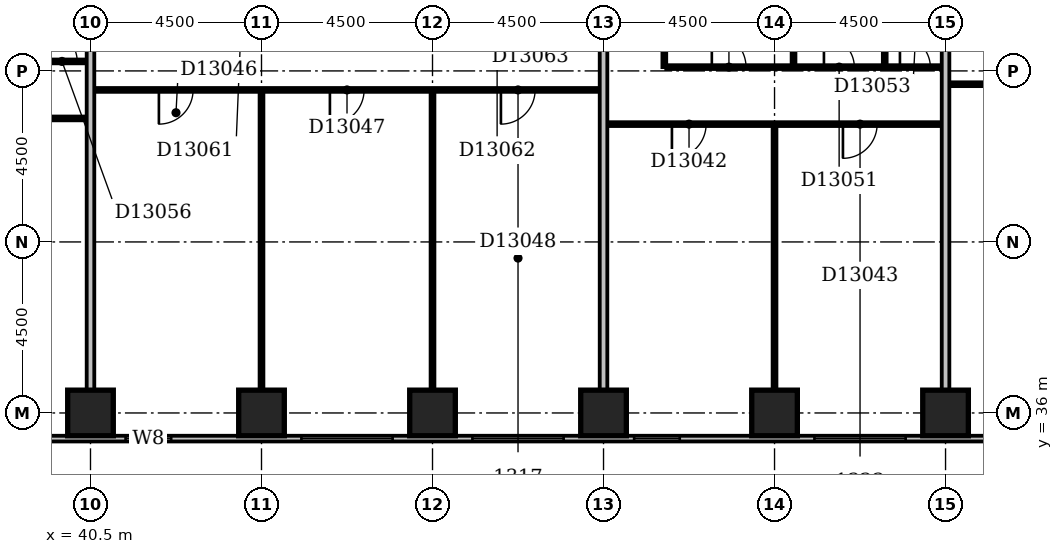
"""IFC4 building model, lengths in metres.
Left out: names, types, materials, properties, quantities, classifications, styles, units other than length and angle.
Written with IfcOpenShell. Run it as: python <this file> out.ifc"""

import sys

from ifc_helpers import new_model, si_unit, direction, frame, frame_2d, origin, origin_2d, place, context, subcontext, project, spatial, rectangle, extrude, element, fill, save


model = new_model("IFC4")
c1 = context("Model", 3, precision=1e-05, world=origin(), true_north=direction((0.0, 1.0)))
c2 = subcontext(c1, "Body", "Model", "MODEL_VIEW")
j1 = project(units=[si_unit("LENGTHUNIT", "METRE"), si_unit("PLANEANGLEUNIT", "RADIAN")], contexts=[c1])
p1 = place(None, origin())
s1 = spatial("IfcSite", under=j1, at=p1, CompositionType="ELEMENT")
p2 = place(p1, origin())
s2 = spatial("IfcBuilding", under=s1, at=p2, CompositionType="ELEMENT")
p3 = place(p2, frame((0.0, 0.0, 57.8)))
s3 = spatial("IfcBuildingStorey", under=s2, at=p3, CompositionType="ELEMENT", Elevation=57.8)
for number, where, z_axis, x_axis in (
    (1, (40.5, 36.0, -0.3), (0.0, 0.0, 1.0), (1.0, 0.0, 0.0)),
    (2, (45.0, 36.0, -0.3), (0.0, 0.0, 1.0), (1.0, 0.0, 0.0)),
    (3, (49.5, 36.0, -0.3), (0.0, 0.0, 1.0), (1.0, 0.0, 0.0)),
    (4, (54.0, 36.0, -0.3), (0.0, 0.0, 1.0), (1.0, 0.0, 0.0)),
    (5, (58.5, 36.0, -0.3), (0.0, 0.0, 1.0), (1.0, 0.0, 0.0)),
    (6, (63.0, 36.0, -0.3), (0.0, 0.0, 1.0), (1.0, 0.0, 0.0)),
):
    element("IfcColumn", number, at=place(p3, frame(where, z_axis=z_axis, x_axis=x_axis)), inside=s3, PredefinedType="COLUMN", context=c2, shape_type="SweptSolid", body=[
        extrude(rectangle(XDim=1.2, YDim=1.2, at=origin_2d()), origin(), (0.0, 0.0, 1.0), 3.6),
    ])
p4 = place(p3, frame((23.1, 35.325, 0.0), z_axis=(0.0, 0.0, 1.0), x_axis=(1.0, 0.0, 0.0)))
e7 = element("IfcWall", 7, at=p4, inside=s3, PredefinedType="STANDARD", context=c2, shape_type="SweptSolid", body=[
    extrude(rectangle(XDim=45.15, YDim=0.15, at=frame_2d((22.575, 0.0))), origin(), (0.0, 0.0, 1.0), 2.7),
])
p5 = place(p4, frame((0.45, 0.0, 0.6)))
e8 = element("IfcOpeningElement", 8, at=p5, cuts=e7, PredefinedType="OPENING", context=c2, shape_type="SweptSolid", body=[
    extrude(rectangle(XDim=2.4, YDim=1.8, at=frame_2d((1.2, 0.9))), frame((0.0, 0.087, 0.0), z_axis=(0.0, -1.0, 0.0), x_axis=(1.0, 0.0, 0.0)), (0.0, 0.0, 1.0), 0.174),
])
p6 = place(p4, frame((6.854, 0.0, 0.6)))
e9 = element("IfcOpeningElement", 9, at=p6, cuts=e7, PredefinedType="OPENING", context=c2, shape_type="SweptSolid", body=[
    extrude(rectangle(XDim=0.6, YDim=1.8, at=frame_2d((0.3, 0.9))), frame((0.0, 0.087, 0.0), z_axis=(0.0, -1.0, 0.0), x_axis=(1.0, 0.0, 0.0)), (0.0, 0.0, 1.0), 0.174),
])
p7 = place(p4, frame((9.45, 0.0, 0.6)))
e10 = element("IfcOpeningElement", 10, at=p7, cuts=e7, PredefinedType="OPENING", context=c2, shape_type="SweptSolid", body=[
    extrude(rectangle(XDim=2.4, YDim=1.8, at=frame_2d((1.2, 0.9))), frame((0.0, 0.087, 0.0), z_axis=(0.0, -1.0, 0.0), x_axis=(1.0, 0.0, 0.0)), (0.0, 0.0, 1.0), 0.174),
])
p8 = place(p4, frame((13.95, 0.0, 0.6)))
e11 = element("IfcOpeningElement", 11, at=p8, cuts=e7, PredefinedType="OPENING", context=c2, shape_type="SweptSolid", body=[
    extrude(rectangle(XDim=2.4, YDim=1.8, at=frame_2d((1.2, 0.9))), frame((0.0, 0.087, 0.0), z_axis=(0.0, -1.0, 0.0), x_axis=(1.0, 0.0, 0.0)), (0.0, 0.0, 1.0), 0.174),
])
p9 = place(p4, frame((18.323, 0.0, 0.6)))
e12 = element("IfcOpeningElement", 12, at=p9, cuts=e7, PredefinedType="OPENING", context=c2, shape_type="SweptSolid", body=[
    extrude(rectangle(XDim=1.2, YDim=1.8, at=frame_2d((0.6, 0.9))), frame((0.0, 0.087, 0.0), z_axis=(0.0, -1.0, 0.0), x_axis=(1.0, 0.0, 0.0)), (0.0, 0.0, 1.0), 0.174),
])
p10 = place(p4, frame((22.95, 0.0, 0.6)))
e13 = element("IfcOpeningElement", 13, at=p10, cuts=e7, PredefinedType="OPENING", context=c2, shape_type="SweptSolid", body=[
    extrude(rectangle(XDim=2.4, YDim=1.8, at=frame_2d((1.2, 0.9))), frame((0.0, 0.087, 0.0), z_axis=(0.0, -1.0, 0.0), x_axis=(1.0, 0.0, 0.0)), (0.0, 0.0, 1.0), 0.174),
])
p11 = place(p4, frame((27.45, 0.0, 0.6)))
e14 = element("IfcOpeningElement", 14, at=p11, cuts=e7, PredefinedType="OPENING", context=c2, shape_type="SweptSolid", body=[
    extrude(rectangle(XDim=2.4, YDim=1.8, at=frame_2d((1.2, 0.9))), frame((0.0, 0.087, 0.0), z_axis=(0.0, -1.0, 0.0), x_axis=(1.0, 0.0, 0.0)), (0.0, 0.0, 1.0), 0.174),
])
p12 = place(p4, frame((31.706, 0.0, 0.6)))
e15 = element("IfcOpeningElement", 15, at=p12, cuts=e7, PredefinedType="OPENING", context=c2, shape_type="SweptSolid", body=[
    extrude(rectangle(XDim=1.2, YDim=1.8, at=frame_2d((0.6, 0.9))), frame((0.0, 0.087, 0.0), z_axis=(0.0, -1.0, 0.0), x_axis=(1.0, 0.0, 0.0)), (0.0, 0.0, 1.0), 0.174),
])
p13 = place(p4, frame((36.45, 0.0, 0.6)))
e16 = element("IfcOpeningElement", 16, at=p13, cuts=e7, PredefinedType="OPENING", context=c2, shape_type="SweptSolid", body=[
    extrude(rectangle(XDim=2.4, YDim=1.8, at=frame_2d((1.2, 0.9))), frame((0.0, 0.087, 0.0), z_axis=(0.0, -1.0, 0.0), x_axis=(1.0, 0.0, 0.0)), (0.0, 0.0, 1.0), 0.174),
])
p14 = place(p4, frame((40.95, 0.0, 0.6)))
e17 = element("IfcOpeningElement", 17, at=p14, cuts=e7, PredefinedType="OPENING", context=c2, shape_type="SweptSolid", body=[
    extrude(rectangle(XDim=2.4, YDim=1.8, at=frame_2d((1.2, 0.9))), frame((0.0, 0.087, 0.0), z_axis=(0.0, -1.0, 0.0), x_axis=(1.0, 0.0, 0.0)), (0.0, 0.0, 1.0), 0.174),
])
p15 = place(p3, frame((40.5, 36.6, 0.0), z_axis=(0.0, 0.0, 1.0), x_axis=(0.0, 1.0, 0.0)))
e18 = element("IfcWall", 18, at=p15, inside=s3, PredefinedType="PARTITIONING", context=c2, shape_type="SweptSolid", body=[
    extrude(rectangle(XDim=12.8, YDim=0.2, at=frame_2d((6.4, 0.0))), origin(), (0.0, 0.0, 1.0), 3.3),
])
p16 = place(p3, frame((45.0, 36.6, 0.0), z_axis=(0.0, 0.0, 1.0), x_axis=(0.0, 1.0, 0.0)))
e19 = element("IfcWall", 19, at=p16, inside=s3, PredefinedType="PARTITIONING", context=c2, shape_type="SweptSolid", body=[
    extrude(rectangle(XDim=7.85, YDim=0.1, at=frame_2d((3.925, 0.0))), origin(), (0.0, 0.0, 1.0), 2.6),
])
p17 = place(p3, frame((49.5, 36.6, 0.0), z_axis=(0.0, 0.0, 1.0), x_axis=(0.0, 1.0, 0.0)))
e20 = element("IfcWall", 20, at=p17, inside=s3, PredefinedType="PARTITIONING", context=c2, shape_type="SweptSolid", body=[
    extrude(rectangle(XDim=7.85, YDim=0.1, at=frame_2d((3.925, 0.0))), origin(), (0.0, 0.0, 1.0), 3.3),
])
p18 = place(p3, frame((54.0, 36.6, 0.0), z_axis=(0.0, 0.0, 1.0), x_axis=(0.0, 1.0, 0.0)))
e21 = element("IfcWall", 21, at=p18, inside=s3, PredefinedType="PARTITIONING", context=c2, shape_type="SweptSolid", body=[
    extrude(rectangle(XDim=12.8, YDim=0.2, at=frame_2d((6.4, 0.0))), origin(), (0.0, 0.0, 1.0), 2.6),
])
p19 = place(p3, frame((58.5, 36.6, 0.0), z_axis=(0.0, 0.0, 1.0), x_axis=(0.0, 1.0, 0.0)))
e22 = element("IfcWall", 22, at=p19, inside=s3, PredefinedType="PARTITIONING", context=c2, shape_type="SweptSolid", body=[
    extrude(rectangle(XDim=6.95, YDim=0.1, at=frame_2d((3.475, 0.0))), origin(), (0.0, 0.0, 1.0), 3.3),
])
p20 = place(p3, frame((63.0, 36.6, 0.0), z_axis=(0.0, 0.0, 1.0), x_axis=(0.0, 1.0, 0.0)))
e23 = element("IfcWall", 23, at=p20, inside=s3, PredefinedType="PARTITIONING", context=c2, shape_type="SweptSolid", body=[
    extrude(rectangle(XDim=12.8, YDim=0.2, at=frame_2d((6.4, 0.0))), origin(), (0.0, 0.0, 1.0), 2.4),
])
p21 = place(p3, frame((54.1, 43.6, 0.0), z_axis=(0.0, 0.0, 1.0), x_axis=(1.0, 0.0, 0.0)))
e24 = element("IfcWall", 24, at=p21, inside=s3, PredefinedType="PARTITIONING", context=c2, shape_type="SweptSolid", body=[
    extrude(rectangle(XDim=8.8, YDim=0.1, at=frame_2d((4.4, 0.0))), origin(), (0.0, 0.0, 1.0), 3.3),
])
p22 = place(p21, frame((1.7, 0.0, 0.0)))
e25 = element("IfcOpeningElement", 25, at=p22, cuts=e24, PredefinedType="OPENING", context=c2, shape_type="SweptSolid", body=[
    extrude(rectangle(XDim=0.9, YDim=2.1, at=frame_2d((0.45, 1.05))), frame((0.0, 0.062, 0.0), z_axis=(0.0, -1.0, 0.0), x_axis=(1.0, 0.0, 0.0)), (0.0, 0.0, 1.0), 0.124),
])
p23 = place(p21, frame((6.2, 0.0, 0.0)))
e26 = element("IfcOpeningElement", 26, at=p23, cuts=e24, PredefinedType="OPENING", context=c2, shape_type="SweptSolid", body=[
    extrude(rectangle(XDim=0.9, YDim=2.1, at=frame_2d((0.45, 1.05))), frame((0.0, 0.062, 0.0), z_axis=(0.0, -1.0, 0.0), x_axis=(1.0, 0.0, 0.0)), (0.0, 0.0, 1.0), 0.124),
])
p24 = place(p3, frame((27.1, 43.75, 0.0), z_axis=(0.0, 0.0, 1.0), x_axis=(1.0, 0.0, 0.0)))
e27 = element("IfcWall", 27, at=p24, inside=s3, PredefinedType="PARTITIONING", context=c2, shape_type="SweptSolid", body=[
    extrude(rectangle(XDim=13.3, YDim=0.1, at=frame_2d((6.65, 0.0))), origin(), (0.0, 0.0, 1.0), 3.3),
])
p25 = place(p24, frame((3.9, 0.0, 0.0)))
e28 = element("IfcOpeningElement", 28, at=p25, cuts=e27, PredefinedType="OPENING", context=c2, shape_type="SweptSolid", body=[
    extrude(rectangle(XDim=0.9, YDim=2.1, at=frame_2d((0.45, 1.05))), frame((0.0, 0.062, 0.0), z_axis=(0.0, -1.0, 0.0), x_axis=(1.0, 0.0, 0.0)), (0.0, 0.0, 1.0), 0.124),
])
p26 = place(p24, frame((10.7, 0.0, 0.0)))
e29 = element("IfcOpeningElement", 29, at=p26, cuts=e27, PredefinedType="OPENING", context=c2, shape_type="SweptSolid", body=[
    extrude(rectangle(XDim=0.9, YDim=2.1, at=frame_2d((0.45, 1.05))), frame((0.0, 0.062, 0.0), z_axis=(0.0, -1.0, 0.0), x_axis=(1.0, 0.0, 0.0)), (0.0, 0.0, 1.0), 0.124),
])
p27 = place(p3, frame((40.6, 44.5, 0.0), z_axis=(0.0, 0.0, 1.0), x_axis=(1.0, 0.0, 0.0)))
e30 = element("IfcWall", 30, at=p27, inside=s3, PredefinedType="PARTITIONING", context=c2, shape_type="SweptSolid", body=[
    extrude(rectangle(XDim=13.3, YDim=0.1, at=frame_2d((6.65, 0.0))), origin(), (0.0, 0.0, 1.0), 3.3),
])
p28 = place(p27, frame((1.7, 0.0, 0.0)))
e31 = element("IfcOpeningElement", 31, at=p28, cuts=e30, PredefinedType="OPENING", context=c2, shape_type="SweptSolid", body=[
    extrude(rectangle(XDim=0.9, YDim=2.1, at=frame_2d((0.45, 1.05))), frame((0.0, 0.062, 0.0), z_axis=(0.0, -1.0, 0.0), x_axis=(1.0, 0.0, 0.0)), (0.0, 0.0, 1.0), 0.124),
])
p29 = place(p27, frame((6.2, 0.0, 0.0)))
e32 = element("IfcOpeningElement", 32, at=p29, cuts=e30, PredefinedType="OPENING", context=c2, shape_type="SweptSolid", body=[
    extrude(rectangle(XDim=0.9, YDim=2.1, at=frame_2d((0.45, 1.05))), frame((0.0, 0.062, 0.0), z_axis=(0.0, -1.0, 0.0), x_axis=(1.0, 0.0, 0.0)), (0.0, 0.0, 1.0), 0.124),
])
p30 = place(p27, frame((10.7, 0.0, 0.0)))
e33 = element("IfcOpeningElement", 33, at=p30, cuts=e30, PredefinedType="OPENING", context=c2, shape_type="SweptSolid", body=[
    extrude(rectangle(XDim=0.9, YDim=2.1, at=frame_2d((0.45, 1.05))), frame((0.0, 0.062, 0.0), z_axis=(0.0, -1.0, 0.0), x_axis=(1.0, 0.0, 0.0)), (0.0, 0.0, 1.0), 0.124),
])
p31 = place(p3, frame((63.1, 44.65, 0.0), z_axis=(0.0, 0.0, 1.0), x_axis=(1.0, 0.0, 0.0)))
e34 = element("IfcWall", 34, at=p31, inside=s3, PredefinedType="PARTITIONING", context=c2, shape_type="SweptSolid", body=[
    extrude(rectangle(XDim=3.8, YDim=0.1, at=frame_2d((1.9, 0.0))), origin(), (0.0, 0.0, 1.0), 3.3),
])
p32 = place(p31, frame((1.7, 0.0, 0.0)))
e35 = element("IfcOpeningElement", 35, at=p32, cuts=e34, PredefinedType="OPENING", context=c2, shape_type="SweptSolid", body=[
    extrude(rectangle(XDim=0.9, YDim=2.1, at=frame_2d((0.45, 1.05))), frame((0.0, 0.062, 0.0), z_axis=(0.0, -1.0, 0.0), x_axis=(1.0, 0.0, 0.0)), (0.0, 0.0, 1.0), 0.124),
])
p33 = place(p3, frame((55.6, 45.1, 0.0), z_axis=(0.0, 0.0, 1.0), x_axis=(0.0, 1.0, 0.0)))
e36 = element("IfcWall", 36, at=p33, inside=s3, PredefinedType="PARTITIONING", context=c2, shape_type="SweptSolid", body=[
    extrude(rectangle(XDim=4.3, YDim=0.1, at=frame_2d((2.15, 0.0))), origin(), (0.0, 0.0, 1.0), 3.3),
])
p34 = place(p3, frame((55.65, 45.1, 0.0), z_axis=(0.0, 0.0, 1.0), x_axis=(1.0, 0.0, 0.0)))
e37 = element("IfcWall", 37, at=p34, inside=s3, PredefinedType="PARTITIONING", context=c2, shape_type="SweptSolid", body=[
    extrude(rectangle(XDim=7.25, YDim=0.1, at=frame_2d((3.625, 0.0))), origin(), (0.0, 0.0, 1.0), 3.3),
])
p35 = place(p34, frame((4.15, 0.0, 0.0)))
e38 = element("IfcOpeningElement", 38, at=p35, cuts=e37, PredefinedType="OPENING", context=c2, shape_type="SweptSolid", body=[
    extrude(rectangle(XDim=0.8, YDim=2.1, at=frame_2d((0.4, 1.05))), frame((0.0, 0.062, 0.0), z_axis=(0.0, -1.0, 0.0), x_axis=(1.0, 0.0, 0.0)), (0.0, 0.0, 1.0), 0.124),
])
p36 = place(p34, frame((1.2, 0.0, 0.0)))
e39 = element("IfcOpeningElement", 39, at=p36, cuts=e37, PredefinedType="OPENING", context=c2, shape_type="SweptSolid", body=[
    extrude(rectangle(XDim=0.9, YDim=2.1, at=frame_2d((0.45, 1.05))), frame((0.0, 0.062, 0.0), z_axis=(0.0, -1.0, 0.0), x_axis=(1.0, 0.0, 0.0)), (0.0, 0.0, 1.0), 0.124),
])
p37 = place(p34, frame((6.15, 0.0, 0.0)))
e40 = element("IfcOpeningElement", 40, at=p37, cuts=e37, PredefinedType="OPENING", context=c2, shape_type="SweptSolid", body=[
    extrude(rectangle(XDim=0.8, YDim=2.1, at=frame_2d((0.4, 1.05))), frame((0.0, 0.062, 0.0), z_axis=(0.0, -1.0, 0.0), x_axis=(1.0, 0.0, 0.0)), (0.0, 0.0, 1.0), 0.124),
])
for number, where, z_axis, x_axis in (
    (41, (59.0, 45.15, 0.0), (0.0, 0.0, 1.0), (0.0, 1.0, 0.0)),
    (42, (61.4, 45.15, 0.0), (0.0, 0.0, 1.0), (0.0, 1.0, 0.0)),
):
    element("IfcWall", number, at=place(p3, frame(where, z_axis=z_axis, x_axis=x_axis)), inside=s3, PredefinedType="PLUMBINGWALL", context=c2, shape_type="SweptSolid", body=[
        extrude(rectangle(XDim=4.25, YDim=0.1, at=frame_2d((2.125, 0.0))), origin(), (0.0, 0.0, 1.0), 3.3),
    ])
p38 = place(p3, frame((28.65, 45.25, 0.0), z_axis=(0.0, 0.0, 1.0), x_axis=(1.0, 0.0, 0.0)))
e43 = element("IfcWall", 43, at=p38, inside=s3, PredefinedType="PARTITIONING", context=c2, shape_type="SweptSolid", body=[
    extrude(rectangle(XDim=11.75, YDim=0.1, at=frame_2d((5.875, 0.0))), origin(), (0.0, 0.0, 1.0), 3.3),
])
p39 = place(p38, frame((8.75, 0.0, 0.0)))
e44 = element("IfcOpeningElement", 44, at=p39, cuts=e43, PredefinedType="OPENING", context=c2, shape_type="SweptSolid", body=[
    extrude(rectangle(XDim=0.8, YDim=2.1, at=frame_2d((0.4, 1.05))), frame((0.0, 0.062, 0.0), z_axis=(0.0, -1.0, 0.0), x_axis=(1.0, 0.0, 0.0)), (0.0, 0.0, 1.0), 0.124),
])
p40 = place(p38, frame((3.5, 0.0, 0.0)))
e45 = element("IfcOpeningElement", 45, at=p40, cuts=e43, PredefinedType="OPENING", context=c2, shape_type="SweptSolid", body=[
    extrude(rectangle(XDim=0.9, YDim=2.1, at=frame_2d((0.45, 1.05))), frame((0.0, 0.062, 0.0), z_axis=(0.0, -1.0, 0.0), x_axis=(1.0, 0.0, 0.0)), (0.0, 0.0, 1.0), 0.124),
])
p41 = place(p38, frame((10.7, 0.0, 0.0)))
e46 = element("IfcOpeningElement", 46, at=p41, cuts=e43, PredefinedType="OPENING", context=c2, shape_type="SweptSolid", body=[
    extrude(rectangle(XDim=0.8, YDim=2.1, at=frame_2d((0.4, 1.05))), frame((0.0, 0.062, 0.0), z_axis=(0.0, -1.0, 0.0), x_axis=(1.0, 0.0, 0.0)), (0.0, 0.0, 1.0), 0.124),
])
p42 = place(p9, origin())
e47 = element("IfcWindow", 47, at=p42, inside=s3, PartitioningType="SINGLE_PANEL", PredefinedType="WINDOW", context=c2, shape_type="SweptSolid", body=[
    extrude(rectangle(XDim=1.2, YDim=1.8, at=frame_2d((0.6, 0.9))), frame((0.0, 0.03, 0.0), z_axis=(0.0, -1.0, 0.0), x_axis=(1.0, 0.0, 0.0)), (0.0, 0.0, 1.0), 0.06),
])
fill(e12, e47)
p43 = place(p10, origin())
e48 = element("IfcWindow", 48, at=p43, inside=s3, PartitioningType="SINGLE_PANEL", PredefinedType="WINDOW", context=c2, shape_type="SweptSolid", body=[
    extrude(rectangle(XDim=2.4, YDim=1.8, at=frame_2d((1.2, 0.9))), frame((0.0, 0.03, 0.0), z_axis=(0.0, -1.0, 0.0), x_axis=(1.0, 0.0, 0.0)), (0.0, 0.0, 1.0), 0.06),
])
fill(e13, e48)
p44 = place(p11, origin())
e49 = element("IfcWindow", 49, at=p44, inside=s3, PartitioningType="SINGLE_PANEL", PredefinedType="WINDOW", context=c2, shape_type="SweptSolid", body=[
    extrude(rectangle(XDim=2.4, YDim=1.8, at=frame_2d((1.2, 0.9))), frame((0.0, 0.03, 0.0), z_axis=(0.0, -1.0, 0.0), x_axis=(1.0, 0.0, 0.0)), (0.0, 0.0, 1.0), 0.06),
])
fill(e14, e49)
p45 = place(p12, origin())
e50 = element("IfcWindow", 50, at=p45, inside=s3, PartitioningType="SINGLE_PANEL", PredefinedType="WINDOW", context=c2, shape_type="SweptSolid", body=[
    extrude(rectangle(XDim=1.2, YDim=1.8, at=frame_2d((0.6, 0.9))), frame((0.0, 0.03, 0.0), z_axis=(0.0, -1.0, 0.0), x_axis=(1.0, 0.0, 0.0)), (0.0, 0.0, 1.0), 0.06),
])
fill(e15, e50)
p46 = place(p13, origin())
e51 = element("IfcWindow", 51, at=p46, inside=s3, PartitioningType="SINGLE_PANEL", PredefinedType="WINDOW", context=c2, shape_type="SweptSolid", body=[
    extrude(rectangle(XDim=2.4, YDim=1.8, at=frame_2d((1.2, 0.9))), frame((0.0, 0.03, 0.0), z_axis=(0.0, -1.0, 0.0), x_axis=(1.0, 0.0, 0.0)), (0.0, 0.0, 1.0), 0.06),
])
fill(e16, e51)
p47 = place(p22, frame((0.9, 0.0, 0.0), z_axis=(0.0, 0.0, 1.0), x_axis=(-1.0, 0.0, 0.0)))
e52 = element("IfcDoor", 52, at=p47, inside=s3, OperationType="SINGLE_SWING_RIGHT", PredefinedType="DOOR", context=c2, shape_type="SweptSolid", body=[
    extrude(rectangle(XDim=0.9, YDim=2.1, at=frame_2d((0.45, 1.05))), frame((0.0, 0.025, 0.0), z_axis=(0.0, -1.0, 0.0), x_axis=(1.0, 0.0, 0.0)), (0.0, 0.0, 1.0), 0.05),
])
fill(e25, e52)
p48 = place(p23, frame((0.9, 0.0, 0.0), z_axis=(0.0, 0.0, 1.0), x_axis=(-1.0, 0.0, 0.0)))
e53 = element("IfcDoor", 53, at=p48, inside=s3, OperationType="SINGLE_SWING_RIGHT", PredefinedType="DOOR", context=c2, shape_type="SweptSolid", body=[
    extrude(rectangle(XDim=0.9, YDim=2.1, at=frame_2d((0.45, 1.05))), frame((0.0, 0.025, 0.0), z_axis=(0.0, -1.0, 0.0), x_axis=(1.0, 0.0, 0.0)), (0.0, 0.0, 1.0), 0.05),
])
fill(e26, e53)
p49 = place(p28, frame((0.9, 0.0, 0.0), z_axis=(0.0, 0.0, 1.0), x_axis=(-1.0, 0.0, 0.0)))
e54 = element("IfcDoor", 54, at=p49, inside=s3, OperationType="SINGLE_SWING_RIGHT", PredefinedType="DOOR", context=c2, shape_type="SweptSolid", body=[
    extrude(rectangle(XDim=0.9, YDim=2.1, at=frame_2d((0.45, 1.05))), frame((0.0, 0.025, 0.0), z_axis=(0.0, -1.0, 0.0), x_axis=(1.0, 0.0, 0.0)), (0.0, 0.0, 1.0), 0.05),
])
fill(e31, e54)
p50 = place(p29, frame((0.9, 0.0, 0.0), z_axis=(0.0, 0.0, 1.0), x_axis=(-1.0, 0.0, 0.0)))
e55 = element("IfcDoor", 55, at=p50, inside=s3, OperationType="SINGLE_SWING_RIGHT", PredefinedType="DOOR", context=c2, shape_type="SweptSolid", body=[
    extrude(rectangle(XDim=0.9, YDim=2.1, at=frame_2d((0.45, 1.05))), frame((0.0, 0.025, 0.0), z_axis=(0.0, -1.0, 0.0), x_axis=(1.0, 0.0, 0.0)), (0.0, 0.0, 1.0), 0.05),
])
fill(e32, e55)
p51 = place(p30, frame((0.9, 0.0, 0.0), z_axis=(0.0, 0.0, 1.0), x_axis=(-1.0, 0.0, 0.0)))
e56 = element("IfcDoor", 56, at=p51, inside=s3, OperationType="SINGLE_SWING_RIGHT", PredefinedType="DOOR", context=c2, shape_type="SweptSolid", body=[
    extrude(rectangle(XDim=0.9, YDim=2.1, at=frame_2d((0.45, 1.05))), frame((0.0, 0.025, 0.0), z_axis=(0.0, -1.0, 0.0), x_axis=(1.0, 0.0, 0.0)), (0.0, 0.0, 1.0), 0.05),
])
fill(e33, e56)
p52 = place(p35, origin())
e57 = element("IfcDoor", 57, at=p52, inside=s3, OperationType="SINGLE_SWING_LEFT", PredefinedType="DOOR", context=c2, shape_type="SweptSolid", body=[
    extrude(rectangle(XDim=0.8, YDim=2.1, at=frame_2d((0.4, 1.05))), frame((0.0, 0.025, 0.0), z_axis=(0.0, -1.0, 0.0), x_axis=(1.0, 0.0, 0.0)), (0.0, 0.0, 1.0), 0.05),
])
fill(e38, e57)
p53 = place(p36, origin())
e58 = element("IfcDoor", 58, at=p53, inside=s3, OperationType="SINGLE_SWING_LEFT", PredefinedType="DOOR", context=c2, shape_type="SweptSolid", body=[
    extrude(rectangle(XDim=0.9, YDim=2.1, at=frame_2d((0.45, 1.05))), frame((0.0, 0.025, 0.0), z_axis=(0.0, -1.0, 0.0), x_axis=(1.0, 0.0, 0.0)), (0.0, 0.0, 1.0), 0.05),
])
fill(e39, e58)
p54 = place(p37, origin())
e59 = element("IfcDoor", 59, at=p54, inside=s3, OperationType="SINGLE_SWING_LEFT", PredefinedType="DOOR", context=c2, shape_type="SweptSolid", body=[
    extrude(rectangle(XDim=0.8, YDim=2.1, at=frame_2d((0.4, 1.05))), frame((0.0, 0.025, 0.0), z_axis=(0.0, -1.0, 0.0), x_axis=(1.0, 0.0, 0.0)), (0.0, 0.0, 1.0), 0.05),
])
fill(e40, e59)
p55 = place(p41, origin())
e60 = element("IfcDoor", 60, at=p55, inside=s3, OperationType="SINGLE_SWING_LEFT", PredefinedType="DOOR", context=c2, shape_type="SweptSolid", body=[
    extrude(rectangle(XDim=0.8, YDim=2.1, at=frame_2d((0.4, 1.05))), frame((0.0, 0.025, 0.0), z_axis=(0.0, -1.0, 0.0), x_axis=(1.0, 0.0, 0.0)), (0.0, 0.0, 1.0), 0.05),
])
fill(e46, e60)
save(model, sys.argv[1])
